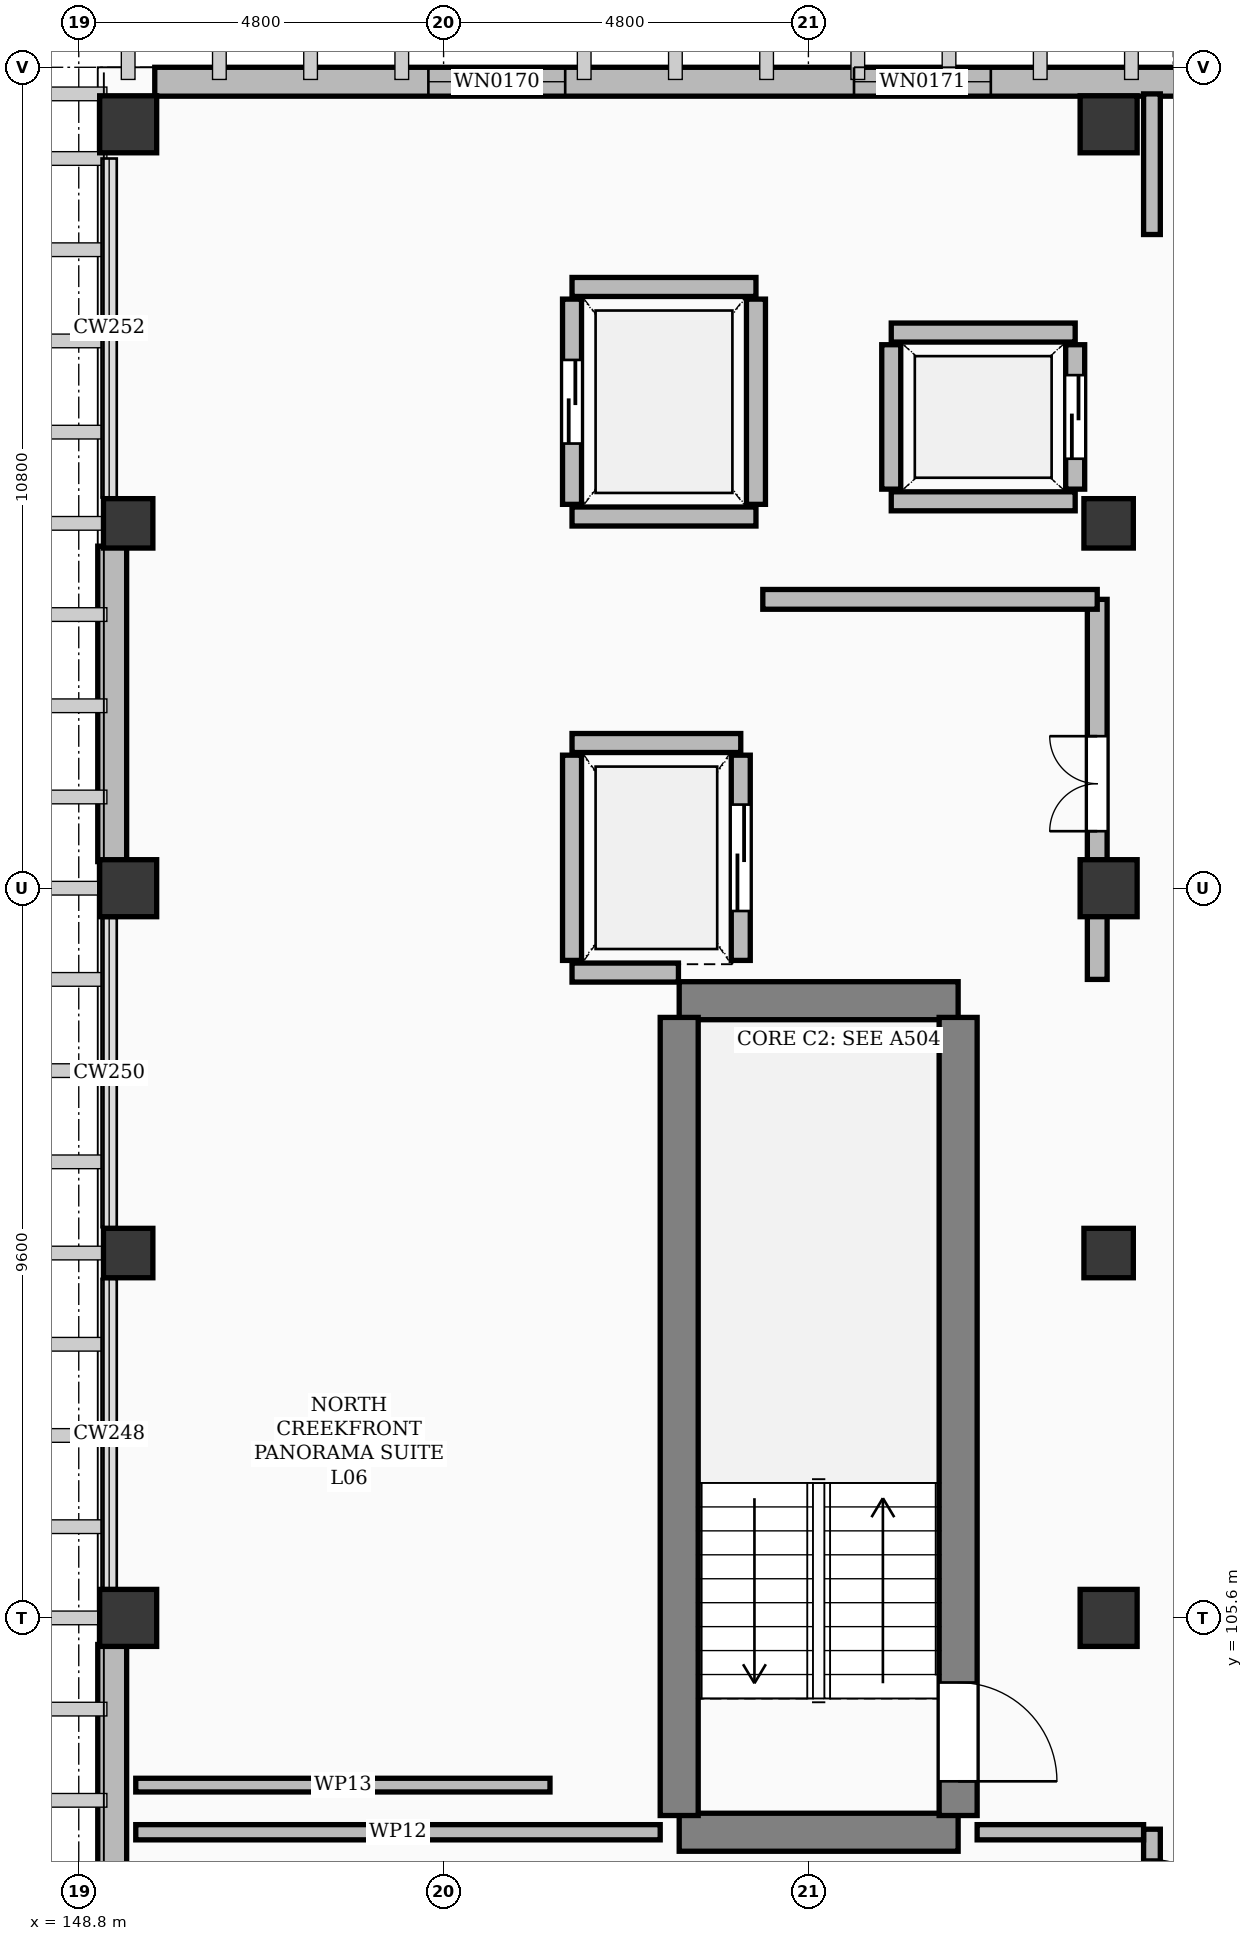
"""IFC4 building model, lengths in metres.
Left out: names, types, materials, properties, quantities, classifications, styles, units other than length and angle.
Written with IfcOpenShell. Run it as: python <this file> out.ifc"""

import sys

from ifc_helpers import new_model, si_unit, direction, frame, frame_2d, origin, origin_2d, place, context, subcontext, project, spatial, rectangle, extrude, element, fill, save


model = new_model("IFC4")
c1 = context("Model", 3, precision=1e-05, world=origin(), true_north=direction((0.0, 1.0)))
c2 = subcontext(c1, "Body", "Model", "MODEL_VIEW")
j1 = project(units=[si_unit("LENGTHUNIT", "METRE"), si_unit("PLANEANGLEUNIT", "RADIAN")], contexts=[c1])
p1 = place(None, origin())
s1 = spatial("IfcSite", under=j1, at=p1, CompositionType="ELEMENT")
p2 = place(p1, origin())
s2 = spatial("IfcBuilding", under=s1, at=p2, CompositionType="ELEMENT")
p3 = place(p2, frame((0.0, 0.0, 28.2)))
s3 = spatial("IfcBuildingStorey", under=s2, at=p3, CompositionType="ELEMENT", Elevation=28.2)
for number, where, z_axis, x_axis in (
    (1, (149.45, 105.6, 0.0), (0.0, 0.0, 1.0), (1.0, 0.0, 0.0)),
    (2, (149.45, 115.2, 0.0), (0.0, 0.0, 1.0), (1.0, 0.0, 0.0)),
    (3, (149.45, 125.25, 0.0), (0.0, 0.0, 1.0), (1.0, 0.0, 0.0)),
    (4, (162.35, 105.6, 0.0), (0.0, 0.0, 1.0), (1.0, 0.0, 0.0)),
    (5, (162.35, 115.2, 0.0), (0.0, 0.0, 1.0), (1.0, 0.0, 0.0)),
    (6, (162.35, 125.25, 0.0), (0.0, 0.0, 1.0), (1.0, 0.0, 0.0)),
):
    element("IfcColumn", number, at=place(p3, frame(where, z_axis=z_axis, x_axis=x_axis)), inside=s3, PredefinedType="COLUMN", context=c2, shape_type="SweptSolid", body=[
        extrude(rectangle(XDim=0.75, YDim=0.75, at=origin_2d()), origin(), (0.0, 0.0, 1.0), 3.6),
    ])
for number, where, z_axis, x_axis in (
    (7, (149.45, 110.4, 0.0), (0.0, 0.0, 1.0), (1.0, 0.0, 0.0)),
    (8, (149.45, 120.0, 0.0), (0.0, 0.0, 1.0), (1.0, 0.0, 0.0)),
    (9, (162.35, 110.4, 0.0), (0.0, 0.0, 1.0), (1.0, 0.0, 0.0)),
    (10, (162.35, 120.0, 0.0), (0.0, 0.0, 1.0), (1.0, 0.0, 0.0)),
):
    element("IfcColumn", number, at=place(p3, frame(where, z_axis=z_axis, x_axis=x_axis)), inside=s3, PredefinedType="COLUMN", context=c2, shape_type="SweptSolid", body=[
        extrude(rectangle(XDim=0.65, YDim=0.65, at=origin_2d()), origin(), (0.0, 0.0, 1.0), 3.6),
    ])
p4 = place(p3, frame((149.8, 125.81, 0.0), z_axis=(0.0, 0.0, 1.0), x_axis=(1.0, 0.0, 0.0)))
e11 = element("IfcWall", 11, at=p4, inside=s3, PredefinedType="SOLIDWALL", context=c2, shape_type="SweptSolid", body=[
    extrude(rectangle(XDim=29.2, YDim=0.38, at=frame_2d((14.6, 0.0))), origin(), (0.0, 0.0, 1.0), 3.34),
])
p5 = place(p4, frame((3.6, 0.0, 0.55)))
e12 = element("IfcOpeningElement", 12, at=p5, cuts=e11, PredefinedType="OPENING", context=c2, shape_type="SweptSolid", body=[
    extrude(rectangle(XDim=1.8, YDim=1.76, at=frame_2d((0.9, 0.88))), frame((0.0, 0.202, 0.0), z_axis=(0.0, -1.0, 0.0), x_axis=(1.0, 0.0, 0.0)), (0.0, 0.0, 1.0), 0.404),
])
p6 = place(p4, frame((9.2, 0.0, 0.55)))
e13 = element("IfcOpeningElement", 13, at=p6, cuts=e11, PredefinedType="OPENING", context=c2, shape_type="SweptSolid", body=[
    extrude(rectangle(XDim=1.8, YDim=1.76, at=frame_2d((0.9, 0.88))), frame((0.0, 0.202, 0.0), z_axis=(0.0, -1.0, 0.0), x_axis=(1.0, 0.0, 0.0)), (0.0, 0.0, 1.0), 0.404),
])
p7 = place(p4, frame((19.6, 0.0, 0.55)))
e14 = element("IfcOpeningElement", 14, at=p7, cuts=e11, PredefinedType="OPENING", context=c2, shape_type="SweptSolid", body=[
    extrude(rectangle(XDim=1.8, YDim=1.76, at=frame_2d((0.9, 0.88))), frame((0.0, 0.202, 0.0), z_axis=(0.0, -1.0, 0.0), x_axis=(1.0, 0.0, 0.0)), (0.0, 0.0, 1.0), 0.404),
])
p8 = place(p4, frame((25.2, 0.0, 0.55)))
e15 = element("IfcOpeningElement", 15, at=p8, cuts=e11, PredefinedType="OPENING", context=c2, shape_type="SweptSolid", body=[
    extrude(rectangle(XDim=1.8, YDim=1.76, at=frame_2d((0.9, 0.88))), frame((0.0, 0.202, 0.0), z_axis=(0.0, -1.0, 0.0), x_axis=(1.0, 0.0, 0.0)), (0.0, 0.0, 1.0), 0.404),
])
for number, where, z_axis, x_axis in (
    (16, (149.24, 101.1, 0.0), (0.0, 0.0, 1.0), (0.0, 1.0, 0.0)),
    (17, (149.24, 115.55, 0.0), (0.0, 0.0, 1.0), (0.0, 1.0, 0.0)),
):
    element("IfcWall", number, at=place(p3, frame(where, z_axis=z_axis, x_axis=x_axis)), inside=s3, PredefinedType="SOLIDWALL", context=c2, shape_type="SweptSolid", body=[
        extrude(rectangle(XDim=4.15, YDim=0.38, at=frame_2d((2.075, 0.0))), origin(), (0.0, 0.0, 1.0), 2.682),
    ])
for number, where, z_axis, x_axis in (
    (18, (156.7, 102.78, 0.0), (0.0, 0.0, 1.0), (1.0, 0.0, 0.0)),
    (19, (156.7, 113.72, 0.0), (0.0, 0.0, 1.0), (1.0, 0.0, 0.0)),
):
    element("IfcWall", number, at=place(p3, frame(where, z_axis=z_axis, x_axis=x_axis)), inside=s3, PredefinedType="SHEAR", context=c2, shape_type="SweptSolid", body=[
        extrude(rectangle(XDim=3.67, YDim=0.5, at=frame_2d((1.835, 0.0))), origin(), (0.0, 0.0, 1.0), 3.34),
    ])
p9 = place(p3, frame((156.7, 103.0, 0.0), z_axis=(0.0, 0.0, 1.0), x_axis=(0.0, 1.0, 0.0)))
e20 = element("IfcWall", 20, at=p9, inside=s3, PredefinedType="SHEAR", context=c2, shape_type="SweptSolid", body=[
    extrude(rectangle(XDim=10.5, YDim=0.5, at=frame_2d((5.25, 0.0))), origin(), (0.0, 0.0, 1.0), 3.34),
])
p10 = place(p3, frame((160.37, 103.0, 0.0), z_axis=(0.0, 0.0, 1.0), x_axis=(0.0, 1.0, 0.0)))
e21 = element("IfcWall", 21, at=p10, inside=s3, PredefinedType="SHEAR", context=c2, shape_type="SweptSolid", body=[
    extrude(rectangle(XDim=10.5, YDim=0.5, at=frame_2d((5.25, 0.0))), origin(), (0.0, 0.0, 1.0), 3.34),
])
p11 = place(p10, frame((0.45, 0.0, 0.0)))
e22 = element("IfcOpeningElement", 22, at=p11, cuts=e21, PredefinedType="OPENING", context=c2, shape_type="SweptSolid", body=[
    extrude(rectangle(XDim=1.3, YDim=2.15, at=frame_2d((0.65, 1.075))), frame((0.0, 0.262, 0.0), z_axis=(0.0, -1.0, 0.0), x_axis=(1.0, 0.0, 0.0)), (0.0, 0.0, 1.0), 0.524),
])
p12 = place(p3, frame((155.29, 114.09, 0.0), z_axis=(0.0, 0.0, 1.0), x_axis=(1.0, 0.0, 0.0)))
e23 = element("IfcWall", 23, at=p12, inside=s3, PredefinedType="SOLIDWALL", context=c2, shape_type="SweptSolid", body=[
    extrude(rectangle(XDim=1.4, YDim=0.25, at=frame_2d((0.7, 0.0))), origin(), (0.0, 0.0, 1.0), 3.34),
])
p13 = place(p3, frame((155.29, 117.11, 0.0), z_axis=(0.0, 0.0, 1.0), x_axis=(1.0, 0.0, 0.0)))
e24 = element("IfcWall", 24, at=p13, inside=s3, PredefinedType="SOLIDWALL", context=c2, shape_type="SweptSolid", body=[
    extrude(rectangle(XDim=2.22, YDim=0.25, at=frame_2d((1.11, 0.0))), origin(), (0.0, 0.0, 1.0), 3.34),
])
p14 = place(p3, frame((155.29, 114.25, 0.0), z_axis=(0.0, 0.0, 1.0), x_axis=(0.0, 1.0, 0.0)))
e25 = element("IfcWall", 25, at=p14, inside=s3, PredefinedType="SOLIDWALL", context=c2, shape_type="SweptSolid", body=[
    extrude(rectangle(XDim=2.7, YDim=0.25, at=frame_2d((1.35, 0.0))), origin(), (0.0, 0.0, 1.0), 2.682),
])
p15 = place(p3, frame((157.51, 114.25, 0.0), z_axis=(0.0, 0.0, 1.0), x_axis=(0.0, 1.0, 0.0)))
e26 = element("IfcWall", 26, at=p15, inside=s3, PredefinedType="SOLIDWALL", context=c2, shape_type="SweptSolid", body=[
    extrude(rectangle(XDim=2.7, YDim=0.25, at=frame_2d((1.35, 0.0))), origin(), (0.0, 0.0, 1.0), 2.682),
])
p16 = place(p15, frame((0.65, 0.0, 0.0)))
e27 = element("IfcOpeningElement", 27, at=p16, cuts=e26, PredefinedType="OPENING", context=c2, shape_type="SweptSolid", body=[
    extrude(rectangle(XDim=1.4, YDim=2.3, at=frame_2d((0.7, 1.15))), frame((0.0, 0.137, 0.0), z_axis=(0.0, -1.0, 0.0), x_axis=(1.0, 0.0, 0.0)), (0.0, 0.0, 1.0), 0.274),
])
p17 = place(p3, frame((159.49, 120.29, 0.0), z_axis=(0.0, 0.0, 1.0), x_axis=(1.0, 0.0, 0.0)))
e28 = element("IfcWall", 28, at=p17, inside=s3, PredefinedType="SOLIDWALL", context=c2, shape_type="SweptSolid", body=[
    extrude(rectangle(XDim=2.42, YDim=0.25, at=frame_2d((1.21, 0.0))), origin(), (0.0, 0.0, 1.0), 2.682),
])
p18 = place(p3, frame((159.49, 122.51, 0.0), z_axis=(0.0, 0.0, 1.0), x_axis=(1.0, 0.0, 0.0)))
e29 = element("IfcWall", 29, at=p18, inside=s3, PredefinedType="SOLIDWALL", context=c2, shape_type="SweptSolid", body=[
    extrude(rectangle(XDim=2.42, YDim=0.25, at=frame_2d((1.21, 0.0))), origin(), (0.0, 0.0, 1.0), 3.34),
])
p19 = place(p3, frame((159.49, 120.45, 0.0), z_axis=(0.0, 0.0, 1.0), x_axis=(0.0, 1.0, 0.0)))
e30 = element("IfcWall", 30, at=p19, inside=s3, PredefinedType="SOLIDWALL", context=c2, shape_type="SweptSolid", body=[
    extrude(rectangle(XDim=1.9, YDim=0.25, at=frame_2d((0.95, 0.0))), origin(), (0.0, 0.0, 1.0), 3.34),
])
p20 = place(p3, frame((161.91, 120.45, 0.0), z_axis=(0.0, 0.0, 1.0), x_axis=(0.0, 1.0, 0.0)))
e31 = element("IfcWall", 31, at=p20, inside=s3, PredefinedType="SOLIDWALL", context=c2, shape_type="SweptSolid", body=[
    extrude(rectangle(XDim=1.9, YDim=0.25, at=frame_2d((0.95, 0.0))), origin(), (0.0, 0.0, 1.0), 3.34),
])
p21 = place(p20, frame((0.4, 0.0, 0.0)))
e32 = element("IfcOpeningElement", 32, at=p21, cuts=e31, PredefinedType="OPENING", context=c2, shape_type="SweptSolid", body=[
    extrude(rectangle(XDim=1.1, YDim=2.2, at=frame_2d((0.55, 1.1))), frame((0.0, 0.137, 0.0), z_axis=(0.0, -1.0, 0.0), x_axis=(1.0, 0.0, 0.0)), (0.0, 0.0, 1.0), 0.274),
])
p22 = place(p3, frame((155.29, 120.09, 0.0), z_axis=(0.0, 0.0, 1.0), x_axis=(1.0, 0.0, 0.0)))
e33 = element("IfcWall", 33, at=p22, inside=s3, PredefinedType="SOLIDWALL", context=c2, shape_type="SweptSolid", body=[
    extrude(rectangle(XDim=2.42, YDim=0.25, at=frame_2d((1.21, 0.0))), origin(), (0.0, 0.0, 1.0), 2.682),
])
p23 = place(p3, frame((155.29, 123.11, 0.0), z_axis=(0.0, 0.0, 1.0), x_axis=(1.0, 0.0, 0.0)))
e34 = element("IfcWall", 34, at=p23, inside=s3, PredefinedType="SOLIDWALL", context=c2, shape_type="SweptSolid", body=[
    extrude(rectangle(XDim=2.42, YDim=0.25, at=frame_2d((1.21, 0.0))), origin(), (0.0, 0.0, 1.0), 3.34),
])
p24 = place(p3, frame((155.29, 120.25, 0.0), z_axis=(0.0, 0.0, 1.0), x_axis=(0.0, 1.0, 0.0)))
e35 = element("IfcWall", 35, at=p24, inside=s3, PredefinedType="SOLIDWALL", context=c2, shape_type="SweptSolid", body=[
    extrude(rectangle(XDim=2.7, YDim=0.25, at=frame_2d((1.35, 0.0))), origin(), (0.0, 0.0, 1.0), 2.682),
])
p25 = place(p24, frame((0.8, 0.0, 0.0)))
e36 = element("IfcOpeningElement", 36, at=p25, cuts=e35, PredefinedType="OPENING", context=c2, shape_type="SweptSolid", body=[
    extrude(rectangle(XDim=1.1, YDim=2.2, at=frame_2d((0.55, 1.1))), frame((0.0, 0.137, 0.0), z_axis=(0.0, -1.0, 0.0), x_axis=(1.0, 0.0, 0.0)), (0.0, 0.0, 1.0), 0.274),
])
p26 = place(p3, frame((157.71, 120.25, 0.0), z_axis=(0.0, 0.0, 1.0), x_axis=(0.0, 1.0, 0.0)))
e37 = element("IfcWall", 37, at=p26, inside=s3, PredefinedType="SOLIDWALL", context=c2, shape_type="SweptSolid", body=[
    extrude(rectangle(XDim=2.7, YDim=0.25, at=frame_2d((1.35, 0.0))), origin(), (0.0, 0.0, 1.0), 2.682),
])
p27 = place(p3, frame((162.2, 114.0, 0.0), z_axis=(0.0, 0.0, 1.0), x_axis=(0.0, 1.0, 0.0)))
e38 = element("IfcWall", 38, at=p27, inside=s3, PredefinedType="SOLIDWALL", context=c2, shape_type="SweptSolid", body=[
    extrude(rectangle(XDim=5.0, YDim=0.26, at=frame_2d((2.5, 0.0))), origin(), (0.0, 0.0, 1.0), 2.682),
])
p28 = place(p27, frame((1.95, 0.0, 0.0)))
e39 = element("IfcOpeningElement", 39, at=p28, cuts=e38, PredefinedType="OPENING", context=c2, shape_type="SweptSolid", body=[
    extrude(rectangle(XDim=1.25, YDim=2.15, at=frame_2d((0.625, 1.075))), frame((0.0, 0.142, 0.0), z_axis=(0.0, -1.0, 0.0), x_axis=(1.0, 0.0, 0.0)), (0.0, 0.0, 1.0), 0.284),
])
p29 = place(p3, frame((157.8, 119.0, 0.0), z_axis=(0.0, 0.0, 1.0), x_axis=(1.0, 0.0, 0.0)))
e40 = element("IfcWall", 40, at=p29, inside=s3, PredefinedType="SOLIDWALL", context=c2, shape_type="SweptSolid", body=[
    extrude(rectangle(XDim=4.4, YDim=0.26, at=frame_2d((2.2, 0.0))), origin(), (0.0, 0.0, 1.0), 2.682),
])
p30 = place(p3, frame((162.92, 95.6, 0.0), z_axis=(0.0, 0.0, 1.0), x_axis=(0.0, 1.0, 0.0)))
e41 = element("IfcWall", 41, at=p30, inside=s3, PredefinedType="PARTITIONING", context=c2, shape_type="SweptSolid", body=[
    extrude(rectangle(XDim=7.22, YDim=0.22, at=frame_2d((3.61, 0.0))), origin(), (0.0, 0.0, 1.0), 2.682),
])
p31 = place(p30, frame((2.05, 0.0, 0.0)))
e42 = element("IfcOpeningElement", 42, at=p31, cuts=e41, PredefinedType="OPENING", context=c2, shape_type="SweptSolid", body=[
    extrude(rectangle(XDim=1.14, YDim=2.26, at=frame_2d((0.57, 1.13))), frame((0.0, 0.122, 0.0), z_axis=(0.0, -1.0, 0.0), x_axis=(1.0, 0.0, 0.0)), (0.0, 0.0, 1.0), 0.244),
])
p32 = place(p30, frame((5.8, 0.0, 0.0)))
e43 = element("IfcOpeningElement", 43, at=p32, cuts=e41, PredefinedType="OPENING", context=c2, shape_type="SweptSolid", body=[
    extrude(rectangle(XDim=1.02, YDim=2.2, at=frame_2d((0.51, 1.1))), frame((0.0, 0.122, 0.0), z_axis=(0.0, -1.0, 0.0), x_axis=(1.0, 0.0, 0.0)), (0.0, 0.0, 1.0), 0.244),
])
p33 = place(p3, frame((162.92, 123.8, 0.0), z_axis=(0.0, 0.0, 1.0), x_axis=(0.0, 1.0, 0.0)))
e44 = element("IfcWall", 44, at=p33, inside=s3, PredefinedType="PARTITIONING", context=c2, shape_type="SweptSolid", body=[
    extrude(rectangle(XDim=1.85, YDim=0.22, at=frame_2d((0.925, 0.0))), origin(), (0.0, 0.0, 1.0), 2.582),
])
p34 = place(p3, frame((149.55, 102.78, 0.0), z_axis=(0.0, 0.0, 1.0), x_axis=(1.0, 0.0, 0.0)))
e45 = element("IfcWall", 45, at=p34, inside=s3, PredefinedType="PARTITIONING", context=c2, shape_type="SweptSolid", body=[
    extrude(rectangle(XDim=6.9, YDim=0.2, at=frame_2d((3.45, 0.0))), origin(), (0.0, 0.0, 1.0), 2.682),
])
p35 = place(p3, frame((160.62, 102.78, 0.0), z_axis=(0.0, 0.0, 1.0), x_axis=(1.0, 0.0, 0.0)))
e46 = element("IfcWall", 46, at=p35, inside=s3, PredefinedType="PARTITIONING", context=c2, shape_type="SweptSolid", body=[
    extrude(rectangle(XDim=2.19, YDim=0.2, at=frame_2d((1.095, 0.0))), origin(), (0.0, 0.0, 1.0), 2.682),
])
p36 = place(p3, frame((149.55, 103.4, 0.0), z_axis=(0.0, 0.0, 1.0), x_axis=(1.0, 0.0, 0.0)))
e47 = element("IfcWall", 47, at=p36, inside=s3, PredefinedType="PARTITIONING", context=c2, shape_type="SweptSolid", body=[
    extrude(rectangle(XDim=5.45, YDim=0.18, at=frame_2d((2.725, 0.0))), origin(), (0.0, 0.0, 1.0), 2.682),
])
p37 = place(p5, origin())
e48 = element("IfcWindow", 48, at=p37, inside=s3, PartitioningType="SINGLE_PANEL", PredefinedType="WINDOW", context=c2, shape_type="SweptSolid", body=[
    extrude(rectangle(XDim=1.8, YDim=1.76, at=frame_2d((0.9, 0.88))), frame((0.0, 0.03, 0.0), z_axis=(0.0, -1.0, 0.0), x_axis=(1.0, 0.0, 0.0)), (0.0, 0.0, 1.0), 0.06),
])
fill(e12, e48)
p38 = place(p6, origin())
e49 = element("IfcWindow", 49, at=p38, inside=s3, PartitioningType="SINGLE_PANEL", PredefinedType="WINDOW", context=c2, shape_type="SweptSolid", body=[
    extrude(rectangle(XDim=1.8, YDim=1.76, at=frame_2d((0.9, 0.88))), frame((0.0, 0.03, 0.0), z_axis=(0.0, -1.0, 0.0), x_axis=(1.0, 0.0, 0.0)), (0.0, 0.0, 1.0), 0.06),
])
fill(e13, e49)
p39 = place(p11, frame((1.3, 0.0, 0.0), z_axis=(0.0, 0.0, 1.0), x_axis=(-1.0, 0.0, 0.0)))
e50 = element("IfcDoor", 50, at=p39, inside=s3, OperationType="SINGLE_SWING_LEFT", PredefinedType="DOOR", context=c2, shape_type="SweptSolid", body=[
    extrude(rectangle(XDim=1.3, YDim=2.15, at=frame_2d((0.65, 1.075))), frame((0.0, 0.025, 0.0), z_axis=(0.0, -1.0, 0.0), x_axis=(1.0, 0.0, 0.0)), (0.0, 0.0, 1.0), 0.05),
])
fill(e22, e50)
p40 = place(p16, origin())
e51 = element("IfcDoor", 51, at=p40, inside=s3, OperationType="SLIDING_TO_LEFT", PredefinedType="DOOR", context=c2, shape_type="SweptSolid", body=[
    extrude(rectangle(XDim=1.4, YDim=2.3, at=frame_2d((0.7, 1.15))), frame((0.0, 0.025, 0.0), z_axis=(0.0, -1.0, 0.0), x_axis=(1.0, 0.0, 0.0)), (0.0, 0.0, 1.0), 0.05),
])
fill(e27, e51)
p41 = place(p21, origin())
e52 = element("IfcDoor", 52, at=p41, inside=s3, OperationType="SLIDING_TO_LEFT", PredefinedType="DOOR", context=c2, shape_type="SweptSolid", body=[
    extrude(rectangle(XDim=1.1, YDim=2.2, at=frame_2d((0.55, 1.1))), frame((0.0, 0.025, 0.0), z_axis=(0.0, -1.0, 0.0), x_axis=(1.0, 0.0, 0.0)), (0.0, 0.0, 1.0), 0.05),
])
fill(e32, e52)
p42 = place(p25, origin())
e53 = element("IfcDoor", 53, at=p42, inside=s3, OperationType="SLIDING_TO_LEFT", PredefinedType="DOOR", context=c2, shape_type="SweptSolid", body=[
    extrude(rectangle(XDim=1.1, YDim=2.2, at=frame_2d((0.55, 1.1))), frame((0.0, 0.025, 0.0), z_axis=(0.0, -1.0, 0.0), x_axis=(1.0, 0.0, 0.0)), (0.0, 0.0, 1.0), 0.05),
])
fill(e36, e53)
p43 = place(p28, origin())
e54 = element("IfcDoor", 54, at=p43, inside=s3, OperationType="DOUBLE_DOOR_SINGLE_SWING", PredefinedType="DOOR", context=c2, shape_type="SweptSolid", body=[
    extrude(rectangle(XDim=1.25, YDim=2.15, at=frame_2d((0.625, 1.075))), frame((0.0, 0.025, 0.0), z_axis=(0.0, -1.0, 0.0), x_axis=(1.0, 0.0, 0.0)), (0.0, 0.0, 1.0), 0.05),
])
fill(e39, e54)
p44 = place(p32, frame((1.02, 0.0, 0.0), z_axis=(0.0, 0.0, 1.0), x_axis=(-1.0, 0.0, 0.0)))
e55 = element("IfcDoor", 55, at=p44, inside=s3, OperationType="SINGLE_SWING_LEFT", PredefinedType="DOOR", context=c2, shape_type="SweptSolid", body=[
    extrude(rectangle(XDim=1.02, YDim=2.2, at=frame_2d((0.51, 1.1))), frame((0.0, 0.025, 0.0), z_axis=(0.0, -1.0, 0.0), x_axis=(1.0, 0.0, 0.0)), (0.0, 0.0, 1.0), 0.05),
])
fill(e43, e55)
save(model, sys.argv[1])
